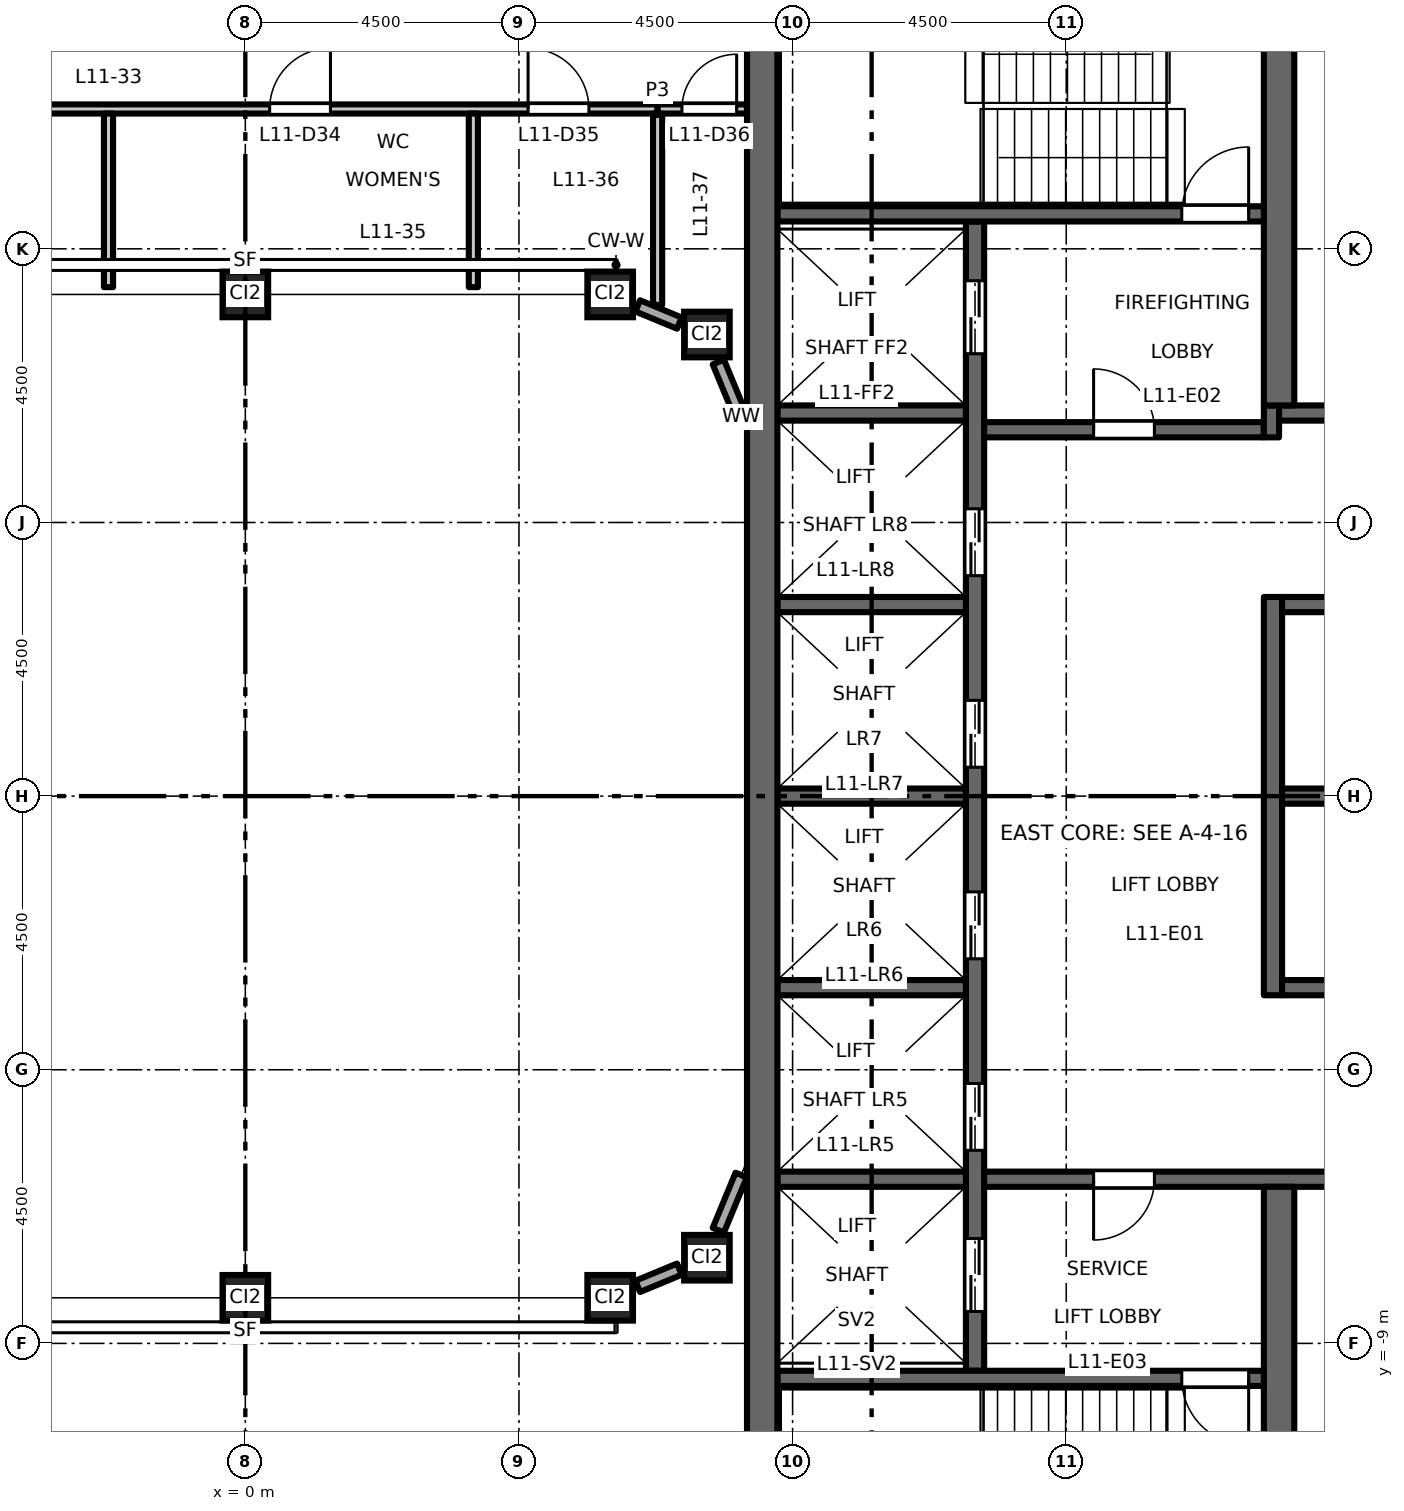
"""IFC4 building model, lengths in metres.
Left out: names, types, materials, properties, quantities, classifications, styles, units other than length and angle.
Written with IfcOpenShell. Run it as: python <this file> out.ifc"""

import sys

from ifc_helpers import new_model, si_unit, direction, frame, frame_2d, origin, origin_2d, place, context, subcontext, project, spatial, rectangle, hollow_rectangle, extrude, element, fill, save


model = new_model("IFC4")
c1 = context("Model", 3, precision=1e-05, world=origin(), true_north=direction((0.0, 1.0)))
c2 = subcontext(c1, "Body", "Model", "MODEL_VIEW")
j1 = project(units=[si_unit("LENGTHUNIT", "METRE"), si_unit("PLANEANGLEUNIT", "RADIAN")], contexts=[c1])
p1 = place(None, origin())
s1 = spatial("IfcSite", under=j1, at=p1, CompositionType="ELEMENT")
p2 = place(p1, origin())
s2 = spatial("IfcBuilding", under=s1, at=p2, CompositionType="ELEMENT")
p3 = place(p2, frame((0.0, 0.0, 53.7)))
s3 = spatial("IfcBuildingStorey", under=s2, at=p3, CompositionType="ELEMENT", Elevation=53.7)
for number, where, z_axis, x_axis in (
    (1, (0.0, -8.25, 0.0), (0.0, 0.0, 1.0), (1.0, 0.0, 0.0)),
    (2, (6.0, -8.25, 0.0), (0.0, 0.0, 1.0), (1.0, 0.0, 0.0)),
    (3, (7.591, -7.591, 0.0), (0.0, 0.0, 1.0), (1.0, 0.0, 0.0)),
    (4, (0.0, 8.25, 0.0), (0.0, 0.0, 1.0), (1.0, 0.0, 0.0)),
    (5, (6.0, 8.25, 0.0), (0.0, 0.0, 1.0), (1.0, 0.0, 0.0)),
    (6, (7.591, 7.591, 0.0), (0.0, 0.0, 1.0), (1.0, 0.0, 0.0)),
):
    element("IfcColumn", number, at=place(p3, frame(where, z_axis=z_axis, x_axis=x_axis)), inside=s3, PredefinedType="COLUMN", context=c2, shape_type="SweptSolid", body=[
        extrude(hollow_rectangle(XDim=0.75, YDim=0.75, WallThickness=0.045, at=origin_2d()), origin(), (0.0, 0.0, 1.0), 4.5),
    ])
p4 = place(p3, frame((12.0, -9.45, 0.0), z_axis=(0.0, 0.0, 1.0), x_axis=(0.0, 1.0, 0.0)))
e7 = element("IfcWall", 7, at=p4, inside=s3, PredefinedType="SHEAR", context=c2, shape_type="SweptSolid", body=[
    extrude(rectangle(XDim=18.9, YDim=0.3, at=frame_2d((9.45, 0.0))), origin(), (0.0, 0.0, 1.0), 4.35),
])
p5 = place(p4, frame((3.625, 0.0, 0.0)))
e8 = element("IfcOpeningElement", 8, at=p5, cuts=e7, PredefinedType="OPENING", context=c2, shape_type="SweptSolid", body=[
    extrude(rectangle(XDim=1.1, YDim=2.1, at=frame_2d((0.55, 1.05))), frame((0.0, 0.16, 0.0), z_axis=(0.0, -1.0, 0.0), x_axis=(1.0, 0.0, 0.0)), (0.0, 0.0, 1.0), 0.32),
])
p6 = place(p4, frame((6.775, 0.0, 0.0)))
e9 = element("IfcOpeningElement", 9, at=p6, cuts=e7, PredefinedType="OPENING", context=c2, shape_type="SweptSolid", body=[
    extrude(rectangle(XDim=1.1, YDim=2.1, at=frame_2d((0.55, 1.05))), frame((0.0, 0.16, 0.0), z_axis=(0.0, -1.0, 0.0), x_axis=(1.0, 0.0, 0.0)), (0.0, 0.0, 1.0), 0.32),
])
p7 = place(p4, frame((9.925, 0.0, 0.0)))
e10 = element("IfcOpeningElement", 10, at=p7, cuts=e7, PredefinedType="OPENING", context=c2, shape_type="SweptSolid", body=[
    extrude(rectangle(XDim=1.1, YDim=2.1, at=frame_2d((0.55, 1.05))), frame((0.0, 0.16, 0.0), z_axis=(0.0, -1.0, 0.0), x_axis=(1.0, 0.0, 0.0)), (0.0, 0.0, 1.0), 0.32),
])
p8 = place(p4, frame((13.075, 0.0, 0.0)))
e11 = element("IfcOpeningElement", 11, at=p8, cuts=e7, PredefinedType="OPENING", context=c2, shape_type="SweptSolid", body=[
    extrude(rectangle(XDim=1.1, YDim=2.1, at=frame_2d((0.55, 1.05))), frame((0.0, 0.16, 0.0), z_axis=(0.0, -1.0, 0.0), x_axis=(1.0, 0.0, 0.0)), (0.0, 0.0, 1.0), 0.32),
])
p9 = place(p4, frame((16.725, 0.0, 0.0)))
e12 = element("IfcOpeningElement", 12, at=p9, cuts=e7, PredefinedType="OPENING", context=c2, shape_type="SweptSolid", body=[
    extrude(rectangle(XDim=1.2, YDim=2.1, at=frame_2d((0.6, 1.05))), frame((0.0, 0.16, 0.0), z_axis=(0.0, -1.0, 0.0), x_axis=(1.0, 0.0, 0.0)), (0.0, 0.0, 1.0), 0.32),
])
p10 = place(p4, frame((0.975, 0.0, 0.0)))
e13 = element("IfcOpeningElement", 13, at=p10, cuts=e7, PredefinedType="OPENING", context=c2, shape_type="SweptSolid", body=[
    extrude(rectangle(XDim=1.2, YDim=2.1, at=frame_2d((0.6, 1.05))), frame((0.0, 0.16, 0.0), z_axis=(0.0, -1.0, 0.0), x_axis=(1.0, 0.0, 0.0)), (0.0, 0.0, 1.0), 0.32),
])
p11 = place(p3, frame((12.15, 6.025, 0.0), z_axis=(0.0, 0.0, 1.0), x_axis=(1.0, 0.0, 0.0)))
e14 = element("IfcWall", 14, at=p11, inside=s3, PredefinedType="SHEAR", context=c2, shape_type="SweptSolid", body=[
    extrude(rectangle(XDim=4.6, YDim=0.25, at=frame_2d((2.3, 0.0))), origin(), (0.0, 0.0, 1.0), 4.35),
])
p12 = place(p11, frame((1.8, 0.0, 0.0)))
e15 = element("IfcOpeningElement", 15, at=p12, cuts=e14, PredefinedType="OPENING", context=c2, shape_type="SweptSolid", body=[
    extrude(rectangle(XDim=1.0, YDim=2.1, at=frame_2d((0.5, 1.05))), frame((0.0, 0.135, 0.0), z_axis=(0.0, -1.0, 0.0), x_axis=(1.0, 0.0, 0.0)), (0.0, 0.0, 1.0), 0.27),
])
p13 = place(p3, frame((16.875, 5.9, 0.0), z_axis=(0.0, 0.0, 1.0), x_axis=(0.0, 1.0, 0.0)))
e16 = element("IfcWall", 16, at=p13, inside=s3, PredefinedType="SHEAR", context=c2, shape_type="SweptSolid", body=[
    extrude(rectangle(XDim=0.525, YDim=0.25, at=frame_2d((0.263, 0.0))), origin(), (0.0, 0.0, 1.0), 4.35),
])
p14 = place(p3, frame((17.0, 6.3, 0.0), z_axis=(0.0, 0.0, 1.0), x_axis=(1.0, 0.0, 0.0)))
e17 = element("IfcWall", 17, at=p14, inside=s3, PredefinedType="SHEAR", context=c2, shape_type="SweptSolid", body=[
    extrude(rectangle(XDim=4.25, YDim=0.25, at=frame_2d((2.125, 0.0))), origin(), (0.0, 0.0, 1.0), 4.35),
])
p15 = place(p14, frame((1.8, 0.0, 0.0)))
e18 = element("IfcOpeningElement", 18, at=p15, cuts=e17, PredefinedType="OPENING", context=c2, shape_type="SweptSolid", body=[
    extrude(rectangle(XDim=0.9, YDim=2.1, at=frame_2d((0.45, 1.05))), frame((0.0, 0.135, 0.0), z_axis=(0.0, -1.0, 0.0), x_axis=(1.0, 0.0, 0.0)), (0.0, 0.0, 1.0), 0.27),
])
p16 = place(p3, frame((12.15, -6.3, 0.0), z_axis=(0.0, 0.0, 1.0), x_axis=(1.0, 0.0, 0.0)))
e19 = element("IfcWall", 19, at=p16, inside=s3, PredefinedType="SHEAR", context=c2, shape_type="SweptSolid", body=[
    extrude(rectangle(XDim=9.1, YDim=0.25, at=frame_2d((4.55, 0.0))), origin(), (0.0, 0.0, 1.0), 4.35),
])
p17 = place(p16, frame((1.8, 0.0, 0.0)))
e20 = element("IfcOpeningElement", 20, at=p17, cuts=e19, PredefinedType="OPENING", context=c2, shape_type="SweptSolid", body=[
    extrude(rectangle(XDim=1.0, YDim=2.1, at=frame_2d((0.5, 1.05))), frame((0.0, 0.135, 0.0), z_axis=(0.0, -1.0, 0.0), x_axis=(1.0, 0.0, 0.0)), (0.0, 0.0, 1.0), 0.27),
])
p18 = place(p3, frame((16.9, -3.275, 0.0), z_axis=(0.0, 0.0, 1.0), x_axis=(0.0, 1.0, 0.0)))
e21 = element("IfcWall", 21, at=p18, inside=s3, PredefinedType="SHEAR", context=c2, shape_type="SweptSolid", body=[
    extrude(rectangle(XDim=6.55, YDim=0.3, at=frame_2d((3.275, 0.0))), origin(), (0.0, 0.0, 1.0), 4.35),
])
for number, where, z_axis, x_axis in (
    (22, (17.05, 0.0, 0.0), (0.0, 0.0, 1.0), (1.0, 0.0, 0.0)),
    (23, (17.05, 3.15, 0.0), (0.0, 0.0, 1.0), (1.0, 0.0, 0.0)),
    (24, (17.05, -3.15, 0.0), (0.0, 0.0, 1.0), (1.0, 0.0, 0.0)),
):
    element("IfcWall", number, at=place(p3, frame(where, z_axis=z_axis, x_axis=x_axis)), inside=s3, PredefinedType="SHEAR", context=c2, shape_type="SweptSolid", body=[
        extrude(rectangle(XDim=4.2, YDim=0.25, at=frame_2d((2.1, 0.0))), origin(), (0.0, 0.0, 1.0), 4.35),
    ])
for number, where, z_axis, x_axis in (
    (25, (17.0, 6.425, 0.0), (0.0, 0.0, 1.0), (0.0, 1.0, 0.0)),
    (26, (17.0, -13.0, 0.0), (0.0, 0.0, 1.0), (0.0, 1.0, 0.0)),
):
    element("IfcWall", number, at=place(p3, frame(where, z_axis=z_axis, x_axis=x_axis)), inside=s3, PredefinedType="SHEAR", context=c2, shape_type="SweptSolid", body=[
        extrude(rectangle(XDim=6.575, YDim=0.5, at=frame_2d((3.288, 0.0))), origin(), (0.0, 0.0, 1.0), 4.35),
    ])
for number, where, z_axis, x_axis in (
    (27, (8.75, 0.0, 0.0), (0.0, 0.0, 1.0), (1.0, 0.0, 0.0)),
    (28, (8.75, 3.15, 0.0), (0.0, 0.0, 1.0), (1.0, 0.0, 0.0)),
    (29, (8.75, 6.3, 0.0), (0.0, 0.0, 1.0), (1.0, 0.0, 0.0)),
    (30, (8.75, -3.15, 0.0), (0.0, 0.0, 1.0), (1.0, 0.0, 0.0)),
    (31, (8.75, -6.3, 0.0), (0.0, 0.0, 1.0), (1.0, 0.0, 0.0)),
):
    element("IfcWall", number, at=place(p3, frame(where, z_axis=z_axis, x_axis=x_axis)), inside=s3, PredefinedType="SHEAR", context=c2, shape_type="SweptSolid", body=[
        extrude(rectangle(XDim=3.1, YDim=0.25, at=frame_2d((1.55, 0.0))), origin(), (0.0, 0.0, 1.0), 4.35),
    ])
p19 = place(p3, frame((8.75, 9.575, 0.0), z_axis=(0.0, 0.0, 1.0), x_axis=(1.0, 0.0, 0.0)))
e32 = element("IfcWall", 32, at=p19, inside=s3, PredefinedType="SHEAR", context=c2, shape_type="SweptSolid", body=[
    extrude(rectangle(XDim=8.0, YDim=0.25, at=frame_2d((4.0, 0.0))), origin(), (0.0, 0.0, 1.0), 4.35),
])
p20 = place(p19, frame((6.65, 0.0, 0.0)))
e33 = element("IfcOpeningElement", 33, at=p20, cuts=e32, PredefinedType="OPENING", context=c2, shape_type="SweptSolid", body=[
    extrude(rectangle(XDim=1.1, YDim=2.1, at=frame_2d((0.55, 1.05))), frame((0.0, 0.135, 0.0), z_axis=(0.0, -1.0, 0.0), x_axis=(1.0, 0.0, 0.0)), (0.0, 0.0, 1.0), 0.27),
])
p21 = place(p3, frame((8.75, -9.575, 0.0), z_axis=(0.0, 0.0, 1.0), x_axis=(1.0, 0.0, 0.0)))
e34 = element("IfcWall", 34, at=p21, inside=s3, PredefinedType="SHEAR", context=c2, shape_type="SweptSolid", body=[
    extrude(rectangle(XDim=8.0, YDim=0.25, at=frame_2d((4.0, 0.0))), origin(), (0.0, 0.0, 1.0), 4.35),
])
p22 = place(p21, frame((6.65, 0.0, 0.0)))
e35 = element("IfcOpeningElement", 35, at=p22, cuts=e34, PredefinedType="OPENING", context=c2, shape_type="SweptSolid", body=[
    extrude(rectangle(XDim=1.1, YDim=2.1, at=frame_2d((0.55, 1.05))), frame((0.0, 0.135, 0.0), z_axis=(0.0, -1.0, 0.0), x_axis=(1.0, 0.0, 0.0)), (0.0, 0.0, 1.0), 0.27),
])
p23 = place(p3, frame((8.5, -13.0, 0.0), z_axis=(0.0, 0.0, 1.0), x_axis=(0.0, 1.0, 0.0)))
e36 = element("IfcWall", 36, at=p23, inside=s3, PredefinedType="SHEAR", context=c2, shape_type="SweptSolid", body=[
    extrude(rectangle(XDim=26.0, YDim=0.5, at=frame_2d((13.0, 0.0))), origin(), (0.0, 0.0, 1.0), 4.35),
])
p24 = place(p3, frame((6.453, -8.062, 0.0), z_axis=(0.0, 0.0, 1.0), x_axis=(0.923940677943, 0.382535780864, 0.0)))
e37 = element("IfcWall", 37, at=p24, inside=s3, PredefinedType="STANDARD", context=c2, shape_type="SweptSolid", body=[
    extrude(rectangle(XDim=0.742, YDim=0.2, at=frame_2d((0.371, 0.0))), origin(), (0.0, 0.0, 1.0), 3.73),
])
for number, where, z_axis, x_axis in (
    (38, (7.779, -7.138, 0.0), (0.0, 0.0, 1.0), (0.383, 0.924, 0.0)),
    (39, (8.154, 6.231, 0.0), (0.0, 0.0, 1.0), (-0.383, 0.924, 0.0)),
):
    element("IfcWall", number, at=place(p3, frame(where, z_axis=z_axis, x_axis=x_axis)), inside=s3, PredefinedType="STANDARD", context=c2, shape_type="SweptSolid", body=[
        extrude(rectangle(XDim=0.982, YDim=0.2, at=frame_2d((0.491, 0.0))), origin(), (0.0, 0.0, 1.0), 3.73),
    ])
p25 = place(p3, frame((7.138, 7.779, 0.0), z_axis=(0.0, 0.0, 1.0), x_axis=(-0.923940677943, 0.382535780864, 0.0)))
e40 = element("IfcWall", 40, at=p25, inside=s3, PredefinedType="STANDARD", context=c2, shape_type="SweptSolid", body=[
    extrude(rectangle(XDim=0.742, YDim=0.2, at=frame_2d((0.371, 0.0))), origin(), (0.0, 0.0, 1.0), 3.73),
])
p26 = place(p3, frame((-8.25, 11.3, 0.0), z_axis=(0.0, 0.0, 1.0), x_axis=(1.0, 0.0, 0.0)))
e41 = element("IfcWall", 41, at=p26, inside=s3, PredefinedType="PARTITIONING", context=c2, shape_type="SweptSolid", body=[
    extrude(rectangle(XDim=15.03, YDim=0.15, at=frame_2d((7.515, 0.0))), origin(), (0.0, 0.0, 1.0), 4.35),
])
p27 = place(p26, frame((2.4, 0.0, 0.0)))
e42 = element("IfcOpeningElement", 42, at=p27, cuts=e41, PredefinedType="OPENING", context=c2, shape_type="SweptSolid", body=[
    extrude(rectangle(XDim=1.0, YDim=2.1, at=frame_2d((0.5, 1.05))), frame((0.0, 0.085, 0.0), z_axis=(0.0, -1.0, 0.0), x_axis=(1.0, 0.0, 0.0)), (0.0, 0.0, 1.0), 0.17),
])
p28 = place(p26, frame((8.65, 0.0, 0.0)))
e43 = element("IfcOpeningElement", 43, at=p28, cuts=e41, PredefinedType="OPENING", context=c2, shape_type="SweptSolid", body=[
    extrude(rectangle(XDim=1.0, YDim=2.1, at=frame_2d((0.5, 1.05))), frame((0.0, 0.085, 0.0), z_axis=(0.0, -1.0, 0.0), x_axis=(1.0, 0.0, 0.0)), (0.0, 0.0, 1.0), 0.17),
])
p29 = place(p26, frame((12.9, 0.0, 0.0)))
e44 = element("IfcOpeningElement", 44, at=p29, cuts=e41, PredefinedType="OPENING", context=c2, shape_type="SweptSolid", body=[
    extrude(rectangle(XDim=1.0, YDim=2.1, at=frame_2d((0.5, 1.05))), frame((0.0, 0.085, 0.0), z_axis=(0.0, -1.0, 0.0), x_axis=(1.0, 0.0, 0.0)), (0.0, 0.0, 1.0), 0.17),
])
p30 = place(p3, frame((6.78, 11.3, 0.0), z_axis=(0.0, 0.0, 1.0), x_axis=(1.0, 0.0, 0.0)))
e45 = element("IfcWall", 45, at=p30, inside=s3, PredefinedType="PARTITIONING", context=c2, shape_type="SweptSolid", body=[
    extrude(rectangle(XDim=1.47, YDim=0.15, at=frame_2d((0.735, 0.0))), origin(), (0.0, 0.0, 1.0), 4.35),
])
p31 = place(p30, frame((0.4, 0.0, 0.0)))
e46 = element("IfcOpeningElement", 46, at=p31, cuts=e45, PredefinedType="OPENING", context=c2, shape_type="SweptSolid", body=[
    extrude(rectangle(XDim=0.9, YDim=2.1, at=frame_2d((0.45, 1.05))), frame((0.0, 0.085, 0.0), z_axis=(0.0, -1.0, 0.0), x_axis=(1.0, 0.0, 0.0)), (0.0, 0.0, 1.0), 0.17),
])
for number, where, z_axis, x_axis in (
    (47, (-2.25, 8.37, 0.0), (0.0, 0.0, 1.0), (0.0, 1.0, 0.0)),
    (48, (3.75, 8.37, 0.0), (0.0, 0.0, 1.0), (0.0, 1.0, 0.0)),
):
    element("IfcWall", number, at=place(p3, frame(where, z_axis=z_axis, x_axis=x_axis)), inside=s3, PredefinedType="PARTITIONING", context=c2, shape_type="SweptSolid", body=[
        extrude(rectangle(XDim=2.855, YDim=0.15, at=frame_2d((1.427, 0.0))), origin(), (0.0, 0.0, 1.0), 4.35),
    ])
p32 = place(p3, frame((6.78, 8.079, 0.0), z_axis=(0.0, 0.0, 1.0), x_axis=(0.0, 1.0, 0.0)))
e49 = element("IfcWall", 49, at=p32, inside=s3, PredefinedType="PARTITIONING", context=c2, shape_type="SweptSolid", body=[
    extrude(rectangle(XDim=3.146, YDim=0.15, at=frame_2d((1.573, 0.0))), origin(), (0.0, 0.0, 1.0), 4.35),
])
p33 = place(p12, origin())
e50 = element("IfcDoor", 50, at=p33, inside=s3, OperationType="SINGLE_SWING_RIGHT", PredefinedType="DOOR", context=c2, shape_type="SweptSolid", body=[
    extrude(rectangle(XDim=1.0, YDim=2.1, at=frame_2d((0.5, 1.05))), frame((0.0, 0.025, 0.0), z_axis=(0.0, -1.0, 0.0), x_axis=(1.0, 0.0, 0.0)), (0.0, 0.0, 1.0), 0.05),
])
fill(e15, e50)
p34 = place(p17, origin())
e51 = element("IfcDoor", 51, at=p34, inside=s3, OperationType="SINGLE_SWING_LEFT", PredefinedType="DOOR", context=c2, shape_type="SweptSolid", body=[
    extrude(rectangle(XDim=1.0, YDim=2.1, at=frame_2d((0.5, 1.05))), frame((0.0, 0.025, 0.0), z_axis=(0.0, -1.0, 0.0), x_axis=(1.0, 0.0, 0.0)), (0.0, 0.0, 1.0), 0.05),
])
fill(e20, e51)
p35 = place(p20, origin())
e52 = element("IfcDoor", 52, at=p35, inside=s3, OperationType="SINGLE_SWING_LEFT", PredefinedType="DOOR", context=c2, shape_type="SweptSolid", body=[
    extrude(rectangle(XDim=1.1, YDim=2.1, at=frame_2d((0.55, 1.05))), frame((0.0, 0.025, 0.0), z_axis=(0.0, -1.0, 0.0), x_axis=(1.0, 0.0, 0.0)), (0.0, 0.0, 1.0), 0.05),
])
fill(e33, e52)
p36 = place(p22, origin())
e53 = element("IfcDoor", 53, at=p36, inside=s3, OperationType="SINGLE_SWING_RIGHT", PredefinedType="DOOR", context=c2, shape_type="SweptSolid", body=[
    extrude(rectangle(XDim=1.1, YDim=2.1, at=frame_2d((0.55, 1.05))), frame((0.0, 0.025, 0.0), z_axis=(0.0, -1.0, 0.0), x_axis=(1.0, 0.0, 0.0)), (0.0, 0.0, 1.0), 0.05),
])
fill(e35, e53)
p37 = place(p5, origin())
e54 = element("IfcDoor", 54, at=p37, inside=s3, OperationType="DOUBLE_DOOR_SLIDING", PredefinedType="DOOR", context=c2, shape_type="SweptSolid", body=[
    extrude(rectangle(XDim=1.1, YDim=2.1, at=frame_2d((0.55, 1.05))), frame((0.0, 0.025, 0.0), z_axis=(0.0, -1.0, 0.0), x_axis=(1.0, 0.0, 0.0)), (0.0, 0.0, 1.0), 0.05),
])
fill(e8, e54)
p38 = place(p6, origin())
e55 = element("IfcDoor", 55, at=p38, inside=s3, OperationType="DOUBLE_DOOR_SLIDING", PredefinedType="DOOR", context=c2, shape_type="SweptSolid", body=[
    extrude(rectangle(XDim=1.1, YDim=2.1, at=frame_2d((0.55, 1.05))), frame((0.0, 0.025, 0.0), z_axis=(0.0, -1.0, 0.0), x_axis=(1.0, 0.0, 0.0)), (0.0, 0.0, 1.0), 0.05),
])
fill(e9, e55)
p39 = place(p7, origin())
e56 = element("IfcDoor", 56, at=p39, inside=s3, OperationType="DOUBLE_DOOR_SLIDING", PredefinedType="DOOR", context=c2, shape_type="SweptSolid", body=[
    extrude(rectangle(XDim=1.1, YDim=2.1, at=frame_2d((0.55, 1.05))), frame((0.0, 0.025, 0.0), z_axis=(0.0, -1.0, 0.0), x_axis=(1.0, 0.0, 0.0)), (0.0, 0.0, 1.0), 0.05),
])
fill(e10, e56)
p40 = place(p8, origin())
e57 = element("IfcDoor", 57, at=p40, inside=s3, OperationType="DOUBLE_DOOR_SLIDING", PredefinedType="DOOR", context=c2, shape_type="SweptSolid", body=[
    extrude(rectangle(XDim=1.1, YDim=2.1, at=frame_2d((0.55, 1.05))), frame((0.0, 0.025, 0.0), z_axis=(0.0, -1.0, 0.0), x_axis=(1.0, 0.0, 0.0)), (0.0, 0.0, 1.0), 0.05),
])
fill(e11, e57)
p41 = place(p9, origin())
e58 = element("IfcDoor", 58, at=p41, inside=s3, OperationType="DOUBLE_DOOR_SLIDING", PredefinedType="DOOR", context=c2, shape_type="SweptSolid", body=[
    extrude(rectangle(XDim=1.2, YDim=2.1, at=frame_2d((0.6, 1.05))), frame((0.0, 0.025, 0.0), z_axis=(0.0, -1.0, 0.0), x_axis=(1.0, 0.0, 0.0)), (0.0, 0.0, 1.0), 0.05),
])
fill(e12, e58)
p42 = place(p10, origin())
e59 = element("IfcDoor", 59, at=p42, inside=s3, OperationType="DOUBLE_DOOR_SLIDING", PredefinedType="DOOR", context=c2, shape_type="SweptSolid", body=[
    extrude(rectangle(XDim=1.2, YDim=2.1, at=frame_2d((0.6, 1.05))), frame((0.0, 0.025, 0.0), z_axis=(0.0, -1.0, 0.0), x_axis=(1.0, 0.0, 0.0)), (0.0, 0.0, 1.0), 0.05),
])
fill(e13, e59)
p43 = place(p28, origin())
e60 = element("IfcDoor", 60, at=p43, inside=s3, OperationType="SINGLE_SWING_RIGHT", PredefinedType="DOOR", context=c2, shape_type="SweptSolid", body=[
    extrude(rectangle(XDim=1.0, YDim=2.1, at=frame_2d((0.5, 1.05))), frame((0.0, 0.025, 0.0), z_axis=(0.0, -1.0, 0.0), x_axis=(1.0, 0.0, 0.0)), (0.0, 0.0, 1.0), 0.05),
])
fill(e43, e60)
p44 = place(p29, origin())
e61 = element("IfcDoor", 61, at=p44, inside=s3, OperationType="SINGLE_SWING_LEFT", PredefinedType="DOOR", context=c2, shape_type="SweptSolid", body=[
    extrude(rectangle(XDim=1.0, YDim=2.1, at=frame_2d((0.5, 1.05))), frame((0.0, 0.025, 0.0), z_axis=(0.0, -1.0, 0.0), x_axis=(1.0, 0.0, 0.0)), (0.0, 0.0, 1.0), 0.05),
])
fill(e44, e61)
p45 = place(p31, origin())
e62 = element("IfcDoor", 62, at=p45, inside=s3, OperationType="SINGLE_SWING_RIGHT", PredefinedType="DOOR", context=c2, shape_type="SweptSolid", body=[
    extrude(rectangle(XDim=0.9, YDim=2.1, at=frame_2d((0.45, 1.05))), frame((0.0, 0.025, 0.0), z_axis=(0.0, -1.0, 0.0), x_axis=(1.0, 0.0, 0.0)), (0.0, 0.0, 1.0), 0.05),
])
fill(e46, e62)
save(model, sys.argv[1])
